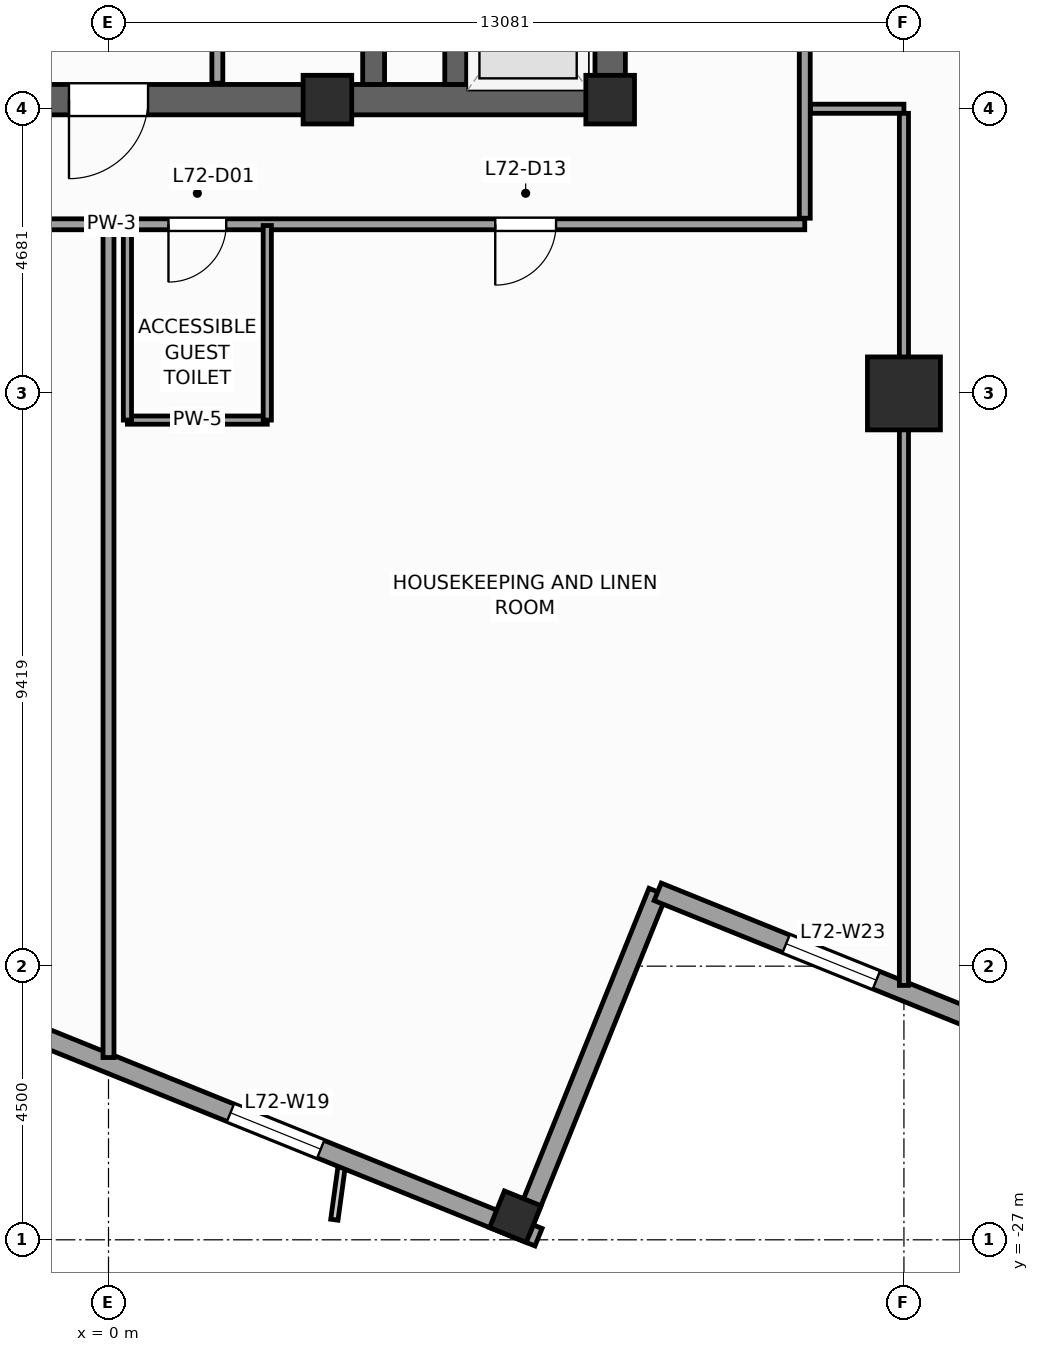
"""IFC4 building model, lengths in metres.
Left out: names, types, materials, properties, quantities, classifications, styles, units other than length and angle.
Written with IfcOpenShell. Run it as: python <this file> out.ifc"""

import sys

from ifc_helpers import new_model, si_unit, direction, frame, frame_2d, origin, origin_2d, place, context, subcontext, project, spatial, rectangle, extrude, source, transform, mapped, element, fill, save


model = new_model("IFC4")
c1 = context("Model", 3, precision=1e-05, world=origin(), true_north=direction((0.0, 1.0)))
c2 = subcontext(c1, "Body", "Model", "MODEL_VIEW")
j1 = project(units=[si_unit("LENGTHUNIT", "METRE"), si_unit("PLANEANGLEUNIT", "RADIAN")], contexts=[c1])
p1 = place(None, origin())
s1 = spatial("IfcSite", under=j1, at=p1, CompositionType="ELEMENT")
p2 = place(p1, origin())
s2 = spatial("IfcBuilding", under=s1, at=p2, CompositionType="ELEMENT")
p3 = place(p2, frame((0.0, 0.0, 294.0)))
s3 = spatial("IfcBuildingStorey", under=s2, at=p3, CompositionType="ELEMENT", Elevation=294.0)
p4 = place(p3, frame((-8.5, -8.25, 0.0), z_axis=(0.0, 0.0, 1.0), x_axis=(1.0, 0.0, 0.0)))
e1 = element("IfcWall", 1, at=p4, inside=s3, PredefinedType="SHEAR", context=c2, shape_type="SweptSolid", body=[
    extrude(rectangle(XDim=17.0, YDim=0.5, at=frame_2d((8.5, 0.0))), origin(), (0.0, 0.0, 1.0), 3.6),
])
p5 = place(p4, frame((7.85, 0.0, 0.0)))
e2 = element("IfcOpeningElement", 2, at=p5, cuts=e1, PredefinedType="OPENING", context=c2, shape_type="SweptSolid", body=[
    extrude(rectangle(XDim=1.3, YDim=2.2, at=frame_2d((0.65, 1.1))), frame((0.0, 0.26, 0.0), z_axis=(0.0, -1.0, 0.0), x_axis=(1.0, 0.0, 0.0)), (0.0, 0.0, 1.0), 0.52),
])
p6 = place(p3, frame((8.25, -8.0, 0.0), z_axis=(0.0, 0.0, 1.0), x_axis=(0.0, 1.0, 0.0)))
e3 = element("IfcWall", 3, at=p6, inside=s3, PredefinedType="SHEAR", context=c2, shape_type="SweptSolid", body=[
    extrude(rectangle(XDim=16.0, YDim=0.5, at=frame_2d((8.0, 0.0))), origin(), (0.0, 0.0, 1.0), 3.6),
])
p7 = place(p6, frame((4.69, 0.0, 0.0)))
e4 = element("IfcOpeningElement", 4, at=p7, cuts=e3, PredefinedType="OPENING", context=c2, shape_type="SweptSolid", body=[
    extrude(rectangle(XDim=1.3, YDim=2.2, at=frame_2d((0.65, 1.1))), frame((0.0, 0.26, 0.0), z_axis=(0.0, -1.0, 0.0), x_axis=(1.0, 0.0, 0.0)), (0.0, 0.0, 1.0), 0.52),
])
p8 = place(p3, frame((4.36, -8.0, 0.0), z_axis=(0.0, 0.0, 1.0), x_axis=(0.0, 1.0, 0.0)))
e5 = element("IfcWall", 5, at=p8, inside=s3, PredefinedType="SHEAR", context=c2, shape_type="SweptSolid", body=[
    extrude(rectangle(XDim=16.0, YDim=0.36, at=frame_2d((8.0, 0.0))), origin(), (0.0, 0.0, 1.0), 3.6),
])
p9 = place(p3, frame((5.71, -8.0, 0.0), z_axis=(0.0, 0.0, 1.0), x_axis=(0.0, 1.0, 0.0)))
e6 = element("IfcWall", 6, at=p9, inside=s3, PredefinedType="SHEAR", context=c2, shape_type="SweptSolid", body=[
    extrude(rectangle(XDim=2.54, YDim=0.36, at=frame_2d((1.27, 0.0))), origin(), (0.0, 0.0, 1.0), 3.6),
])
m1 = source(origin(), c2, "Body", "SweptSolid", [
    extrude(rectangle(XDim=0.8, YDim=0.8, at=origin_2d()), origin(), (0.0, 0.0, 1.0), 3.6),
])
for number, where, z_axis, x_axis in (
    (7, (8.25, -8.25, 0.0), (0.0, 0.0, 1.0), (1.0, 0.0, 0.0)),
    (8, (3.6, -8.25, 0.0), (0.0, 0.0, 1.0), (1.0, 0.0, 0.0)),
):
    element("IfcColumn", number, at=place(p3, frame(where, z_axis=z_axis, x_axis=x_axis)), inside=s3, PredefinedType="PILASTER", context=c2, shape_type="MappedRepresentation", body=[
        mapped(m1, transform((0.0, 0.0, 0.0), scale=1.0)),
    ])
m2 = source(origin(), c2, "Body", "SweptSolid", [
    extrude(rectangle(XDim=1.2, YDim=1.2, at=origin_2d()), origin(), (0.0, 0.0, 1.0), 3.6),
])
p10 = place(p3, frame((13.081, -13.081, 0.0), z_axis=(0.0, 0.0, 1.0), x_axis=(1.0, 0.0, 0.0)))
e9 = element("IfcColumn", 9, at=p10, inside=s3, PredefinedType="COLUMN", context=c2, shape_type="MappedRepresentation", body=[
    mapped(m2, transform((0.0, 0.0, 0.0), scale=1.0)),
])
m3 = source(origin(), c2, "Body", "SweptSolid", [
    extrude(rectangle(XDim=0.65, YDim=0.65, at=origin_2d()), origin(), (0.0, 0.0, 1.0), 3.6),
])
p11 = place(p3, frame((6.69, -26.62, 0.0), z_axis=(0.0, 0.0, 1.0), x_axis=(0.374606593416, 0.927183854567, 0.0)))
e10 = element("IfcColumn", 10, at=p11, inside=s3, PredefinedType="COLUMN", context=c2, shape_type="MappedRepresentation", body=[
    mapped(m3, transform((0.0, 0.0, 0.0), scale=1.0)),
])
p12 = place(p3, frame((-23.813, -14.479, 0.0), z_axis=(0.0, 0.0, 1.0), x_axis=(0.927182657188, -0.374609557019, 0.0)))
e11 = element("IfcWall", 11, at=p12, inside=s3, PredefinedType="STANDARD", context=c2, shape_type="SweptSolid", body=[
    extrude(rectangle(XDim=33.31, YDim=0.31, at=frame_2d((16.655, 0.0))), origin(), (0.0, 0.0, 1.0), 2.75),
])
p13 = place(p12, frame((3.197, 0.0, 0.47)))
e12 = element("IfcOpeningElement", 12, at=p13, cuts=e11, PredefinedType="OPENING", context=c2, shape_type="SweptSolid", body=[
    extrude(rectangle(XDim=1.6, YDim=2.1, at=frame_2d((0.8, 1.05))), frame((0.0, 0.165, 0.0), z_axis=(0.0, -1.0, 0.0), x_axis=(1.0, 0.0, 0.0)), (0.0, 0.0, 1.0), 0.33),
])
p14 = place(p12, frame((8.86, 0.0, 0.47)))
e13 = element("IfcOpeningElement", 13, at=p14, cuts=e11, PredefinedType="OPENING", context=c2, shape_type="SweptSolid", body=[
    extrude(rectangle(XDim=1.6, YDim=2.1, at=frame_2d((0.8, 1.05))), frame((0.0, 0.165, 0.0), z_axis=(0.0, -1.0, 0.0), x_axis=(1.0, 0.0, 0.0)), (0.0, 0.0, 1.0), 0.33),
])
p15 = place(p12, frame((14.439, 0.0, 0.47)))
e14 = element("IfcOpeningElement", 14, at=p15, cuts=e11, PredefinedType="OPENING", context=c2, shape_type="SweptSolid", body=[
    extrude(rectangle(XDim=1.6, YDim=2.1, at=frame_2d((0.8, 1.05))), frame((0.0, 0.165, 0.0), z_axis=(0.0, -1.0, 0.0), x_axis=(1.0, 0.0, 0.0)), (0.0, 0.0, 1.0), 0.33),
])
p16 = place(p12, frame((21.851, 0.0, 0.47)))
e15 = element("IfcOpeningElement", 15, at=p16, cuts=e11, PredefinedType="OPENING", context=c2, shape_type="SweptSolid", body=[
    extrude(rectangle(XDim=1.6, YDim=2.1, at=frame_2d((0.8, 1.05))), frame((0.0, 0.165, 0.0), z_axis=(0.0, -1.0, 0.0), x_axis=(1.0, 0.0, 0.0)), (0.0, 0.0, 1.0), 0.33),
])
p17 = place(p12, frame((27.847, 0.0, 0.47)))
e16 = element("IfcOpeningElement", 16, at=p17, cuts=e11, PredefinedType="OPENING", context=c2, shape_type="SweptSolid", body=[
    extrude(rectangle(XDim=1.6, YDim=2.1, at=frame_2d((0.8, 1.05))), frame((0.0, 0.165, 0.0), z_axis=(0.0, -1.0, 0.0), x_axis=(1.0, 0.0, 0.0)), (0.0, 0.0, 1.0), 0.33),
])
p18 = place(p3, frame((6.784, -26.841, 0.0), z_axis=(0.0, 0.0, 1.0), x_axis=(0.374636620962, 0.927171722085, 0.0)))
e17 = element("IfcWall", 17, at=p18, inside=s3, PredefinedType="STANDARD", context=c2, shape_type="SweptSolid", body=[
    extrude(rectangle(XDim=6.0, YDim=0.31, at=frame_2d((3.0, 0.0))), origin(), (0.0, 0.0, 1.0), 2.65),
])
p19 = place(p3, frame((9.032, -21.278, 0.0), z_axis=(0.0, 0.0, 1.0), x_axis=(0.927185411764, -0.374602739196, 0.0)))
e18 = element("IfcWall", 18, at=p19, inside=s3, PredefinedType="STANDARD", context=c2, shape_type="SweptSolid", body=[
    extrude(rectangle(XDim=6.155, YDim=0.31, at=frame_2d((3.078, 0.0))), origin(), (0.0, 0.0, 1.0), 3.35),
])
p20 = place(p19, frame((2.278, 0.0, 0.47)))
e19 = element("IfcOpeningElement", 19, at=p20, cuts=e18, PredefinedType="OPENING", context=c2, shape_type="SweptSolid", body=[
    extrude(rectangle(XDim=1.6, YDim=2.1, at=frame_2d((0.8, 1.05))), frame((0.0, 0.165, 0.0), z_axis=(0.0, -1.0, 0.0), x_axis=(1.0, 0.0, 0.0)), (0.0, 0.0, 1.0), 0.33),
])
p21 = place(p3, frame((1.79, -7.98, 0.0), z_axis=(0.0, 0.0, 1.0), x_axis=(0.0, 1.0, 0.0)))
e20 = element("IfcWall", 20, at=p21, inside=s3, PredefinedType="PARTITIONING", context=c2, shape_type="SweptSolid", body=[
    extrude(rectangle(XDim=12.38, YDim=0.18, at=frame_2d((6.19, 0.0))), origin(), (0.0, 0.0, 1.0), 3.35),
])
p22 = place(p21, frame((8.8, 0.0, 0.0)))
e21 = element("IfcOpeningElement", 21, at=p22, cuts=e20, PredefinedType="OPENING", context=c2, shape_type="SweptSolid", body=[
    extrude(rectangle(XDim=1.1, YDim=2.2, at=frame_2d((0.55, 1.1))), frame((0.0, 0.1, 0.0), z_axis=(0.0, -1.0, 0.0), x_axis=(1.0, 0.0, 0.0)), (0.0, 0.0, 1.0), 0.2),
])
p23 = place(p21, frame((10.86, 0.0, 0.0)))
e22 = element("IfcOpeningElement", 22, at=p23, cuts=e20, PredefinedType="OPENING", context=c2, shape_type="SweptSolid", body=[
    extrude(rectangle(XDim=1.1, YDim=2.2, at=frame_2d((0.55, 1.1))), frame((0.0, 0.1, 0.0), z_axis=(0.0, -1.0, 0.0), x_axis=(1.0, 0.0, 0.0)), (0.0, 0.0, 1.0), 0.2),
])
p24 = place(p21, frame((3.5, 0.0, 0.0)))
e23 = element("IfcOpeningElement", 23, at=p24, cuts=e20, PredefinedType="OPENING", context=c2, shape_type="SweptSolid", body=[
    extrude(rectangle(XDim=1.15, YDim=2.25, at=frame_2d((0.575, 1.125))), frame((0.0, 0.1, 0.0), z_axis=(0.0, -1.0, 0.0), x_axis=(1.0, 0.0, 0.0)), (0.0, 0.0, 1.0), 0.2),
])
p25 = place(p3, frame((-11.35, -10.3, 0.0), z_axis=(0.0, 0.0, 1.0), x_axis=(1.0, 0.0, 0.0)))
e24 = element("IfcWall", 24, at=p25, inside=s3, PredefinedType="PARTITIONING", context=c2, shape_type="SweptSolid", body=[
    extrude(rectangle(XDim=22.8, YDim=0.18, at=frame_2d((11.4, 0.0))), origin(), (0.0, 0.0, 1.0), 3.35),
])
p26 = place(p25, frame((12.336, 0.0, 0.0)))
e25 = element("IfcOpeningElement", 25, at=p26, cuts=e24, PredefinedType="OPENING", context=c2, shape_type="SweptSolid", body=[
    extrude(rectangle(XDim=0.95, YDim=2.1, at=frame_2d((0.475, 1.05))), frame((0.0, 0.1, 0.0), z_axis=(0.0, -1.0, 0.0), x_axis=(1.0, 0.0, 0.0)), (0.0, 0.0, 1.0), 0.2),
])
p27 = place(p25, frame((17.71, 0.0, 0.0)))
e26 = element("IfcOpeningElement", 26, at=p27, cuts=e24, PredefinedType="OPENING", context=c2, shape_type="SweptSolid", body=[
    extrude(rectangle(XDim=1.0, YDim=2.15, at=frame_2d((0.5, 1.075))), frame((0.0, 0.1, 0.0), z_axis=(0.0, -1.0, 0.0), x_axis=(1.0, 0.0, 0.0)), (0.0, 0.0, 1.0), 0.2),
])
p28 = place(p25, frame((5.339, 0.0, 0.0)))
e27 = element("IfcOpeningElement", 27, at=p28, cuts=e24, PredefinedType="OPENING", context=c2, shape_type="SweptSolid", body=[
    extrude(rectangle(XDim=1.0, YDim=2.15, at=frame_2d((0.5, 1.075))), frame((0.0, 0.1, 0.0), z_axis=(0.0, -1.0, 0.0), x_axis=(1.0, 0.0, 0.0)), (0.0, 0.0, 1.0), 0.2),
])
p29 = place(p3, frame((11.45, -10.2, 0.0), z_axis=(0.0, 0.0, 1.0), x_axis=(0.0, 1.0, 0.0)))
e28 = element("IfcWall", 28, at=p29, inside=s3, PredefinedType="PARTITIONING", context=c2, shape_type="SweptSolid", body=[
    extrude(rectangle(XDim=22.55, YDim=0.18, at=frame_2d((11.275, 0.0))), origin(), (0.0, 0.0, 1.0), 3.35),
])
p30 = place(p29, frame((13.9, 0.0, 0.0)))
e29 = element("IfcOpeningElement", 29, at=p30, cuts=e28, PredefinedType="OPENING", context=c2, shape_type="SweptSolid", body=[
    extrude(rectangle(XDim=1.0, YDim=2.15, at=frame_2d((0.5, 1.075))), frame((0.0, 0.1, 0.0), z_axis=(0.0, -1.0, 0.0), x_axis=(1.0, 0.0, 0.0)), (0.0, 0.0, 1.0), 0.2),
])
p31 = place(p29, frame((5.5, 0.0, 0.0)))
e30 = element("IfcOpeningElement", 30, at=p31, cuts=e28, PredefinedType="OPENING", context=c2, shape_type="SweptSolid", body=[
    extrude(rectangle(XDim=1.0, YDim=2.15, at=frame_2d((0.5, 1.075))), frame((0.0, 0.1, 0.0), z_axis=(0.0, -1.0, 0.0), x_axis=(1.0, 0.0, 0.0)), (0.0, 0.0, 1.0), 0.2),
])
p32 = place(p3, frame((0.0, -10.395, 0.0), z_axis=(0.0, 0.0, 1.0), x_axis=(0.0, -1.0, 0.0)))
e31 = element("IfcWall", 31, at=p32, inside=s3, PredefinedType="PARTITIONING", context=c2, shape_type="SweptSolid", body=[
    extrude(rectangle(XDim=13.608, YDim=0.18, at=frame_2d((6.804, 0.0))), origin(), (0.0, 0.0, 1.0), 3.02),
])
p33 = place(p3, frame((11.545, -8.4, 0.0), z_axis=(0.0, 0.0, 1.0), x_axis=(1.0, 0.0, 0.0)))
e32 = element("IfcWall", 32, at=p33, inside=s3, PredefinedType="PARTITIONING", context=c2, shape_type="SweptSolid", body=[
    extrude(rectangle(XDim=1.536, YDim=0.15, at=frame_2d((0.768, 0.0))), origin(), (0.0, 0.0, 1.0), 3.35),
])
p34 = place(p3, frame((13.081, -8.475, 0.0), z_axis=(0.0, 0.0, 1.0), x_axis=(0.0, -1.0, 0.0)))
e33 = element("IfcWall", 33, at=p34, inside=s3, PredefinedType="PARTITIONING", context=c2, shape_type="SweptSolid", body=[
    extrude(rectangle(XDim=14.342, YDim=0.15, at=frame_2d((7.171, 0.0))), origin(), (0.0, 0.0, 1.0), 2.45),
])
p35 = place(p3, frame((0.311, -13.52, 0.0), z_axis=(0.0, 0.0, 1.0), x_axis=(1.0, 0.0, 0.0)))
e34 = element("IfcWall", 34, at=p35, inside=s3, PredefinedType="PARTITIONING", context=c2, shape_type="SweptSolid", body=[
    extrude(rectangle(XDim=2.3, YDim=0.135, at=frame_2d((1.15, 0.0))), origin(), (0.0, 0.0, 1.0), 3.35),
])
for number, where, z_axis, x_axis in (
    (35, (2.611, -13.52, 0.0), (0.0, 0.0, 1.0), (0.0, 1.0, 0.0)),
    (36, (0.311, -13.52, 0.0), (0.0, 0.0, 1.0), (0.0, 1.0, 0.0)),
):
    element("IfcWall", number, at=place(p3, frame(where, z_axis=z_axis, x_axis=x_axis)), inside=s3, PredefinedType="PARTITIONING", context=c2, shape_type="SweptSolid", body=[
        extrude(rectangle(XDim=3.2, YDim=0.135, at=frame_2d((1.6, 0.0))), origin(), (0.0, 0.0, 1.0), 3.35),
    ])
m4 = source(origin(), c2, "Body", "SweptSolid", [
    extrude(rectangle(XDim=1.6, YDim=2.1, at=frame_2d((0.8, 1.05))), frame((0.0, 0.03, 0.0), z_axis=(0.0, -1.0, 0.0), x_axis=(1.0, 0.0, 0.0)), (0.0, 0.0, 1.0), 0.06),
])
p36 = place(p17, origin())
e37 = element("IfcWindow", 37, at=p36, inside=s3, PartitioningType="SINGLE_PANEL", PredefinedType="WINDOW", context=c2, shape_type="MappedRepresentation", body=[
    mapped(m4, transform((0.0, 0.0, 0.0), scale=1.0)),
])
fill(e16, e37)
p37 = place(p20, origin())
e38 = element("IfcWindow", 38, at=p37, inside=s3, PartitioningType="SINGLE_PANEL", PredefinedType="WINDOW", context=c2, shape_type="MappedRepresentation", body=[
    mapped(m4, transform((0.0, 0.0, 0.0), scale=1.0)),
])
fill(e19, e38)
m5 = source(origin(), c2, "Body", "SweptSolid", [
    extrude(rectangle(XDim=1.3, YDim=2.2, at=frame_2d((0.65, 1.1))), frame((0.0, 0.025, 0.0), z_axis=(0.0, -1.0, 0.0), x_axis=(1.0, 0.0, 0.0)), (0.0, 0.0, 1.0), 0.05),
])
p38 = place(p5, frame((1.3, 0.0, 0.0), z_axis=(0.0, 0.0, 1.0), x_axis=(-1.0, 0.0, 0.0)))
e39 = element("IfcDoor", 39, at=p38, inside=s3, OperationType="SINGLE_SWING_LEFT", PredefinedType="DOOR", context=c2, shape_type="MappedRepresentation", body=[
    mapped(m5, transform((0.0, 0.0, 0.0), scale=1.0)),
])
fill(e2, e39)
m6 = source(origin(), c2, "Body", "SweptSolid", [
    extrude(rectangle(XDim=0.95, YDim=2.1, at=frame_2d((0.475, 1.05))), frame((0.0, 0.025, 0.0), z_axis=(0.0, -1.0, 0.0), x_axis=(1.0, 0.0, 0.0)), (0.0, 0.0, 1.0), 0.05),
])
p39 = place(p26, frame((0.95, 0.0, 0.0), z_axis=(0.0, 0.0, 1.0), x_axis=(-1.0, 0.0, 0.0)))
e40 = element("IfcDoor", 40, at=p39, inside=s3, OperationType="SINGLE_SWING_LEFT", PredefinedType="DOOR", context=c2, shape_type="MappedRepresentation", body=[
    mapped(m6, transform((0.0, 0.0, 0.0), scale=1.0)),
])
fill(e25, e40)
m7 = source(origin(), c2, "Body", "SweptSolid", [
    extrude(rectangle(XDim=1.0, YDim=2.15, at=frame_2d((0.5, 1.075))), frame((0.0, 0.025, 0.0), z_axis=(0.0, -1.0, 0.0), x_axis=(1.0, 0.0, 0.0)), (0.0, 0.0, 1.0), 0.05),
])
p40 = place(p27, frame((1.0, 0.0, 0.0), z_axis=(0.0, 0.0, 1.0), x_axis=(-1.0, 0.0, 0.0)))
e41 = element("IfcDoor", 41, at=p40, inside=s3, OperationType="SINGLE_SWING_LEFT", PredefinedType="DOOR", context=c2, shape_type="MappedRepresentation", body=[
    mapped(m7, transform((0.0, 0.0, 0.0), scale=1.0)),
])
fill(e26, e41)
save(model, sys.argv[1])
